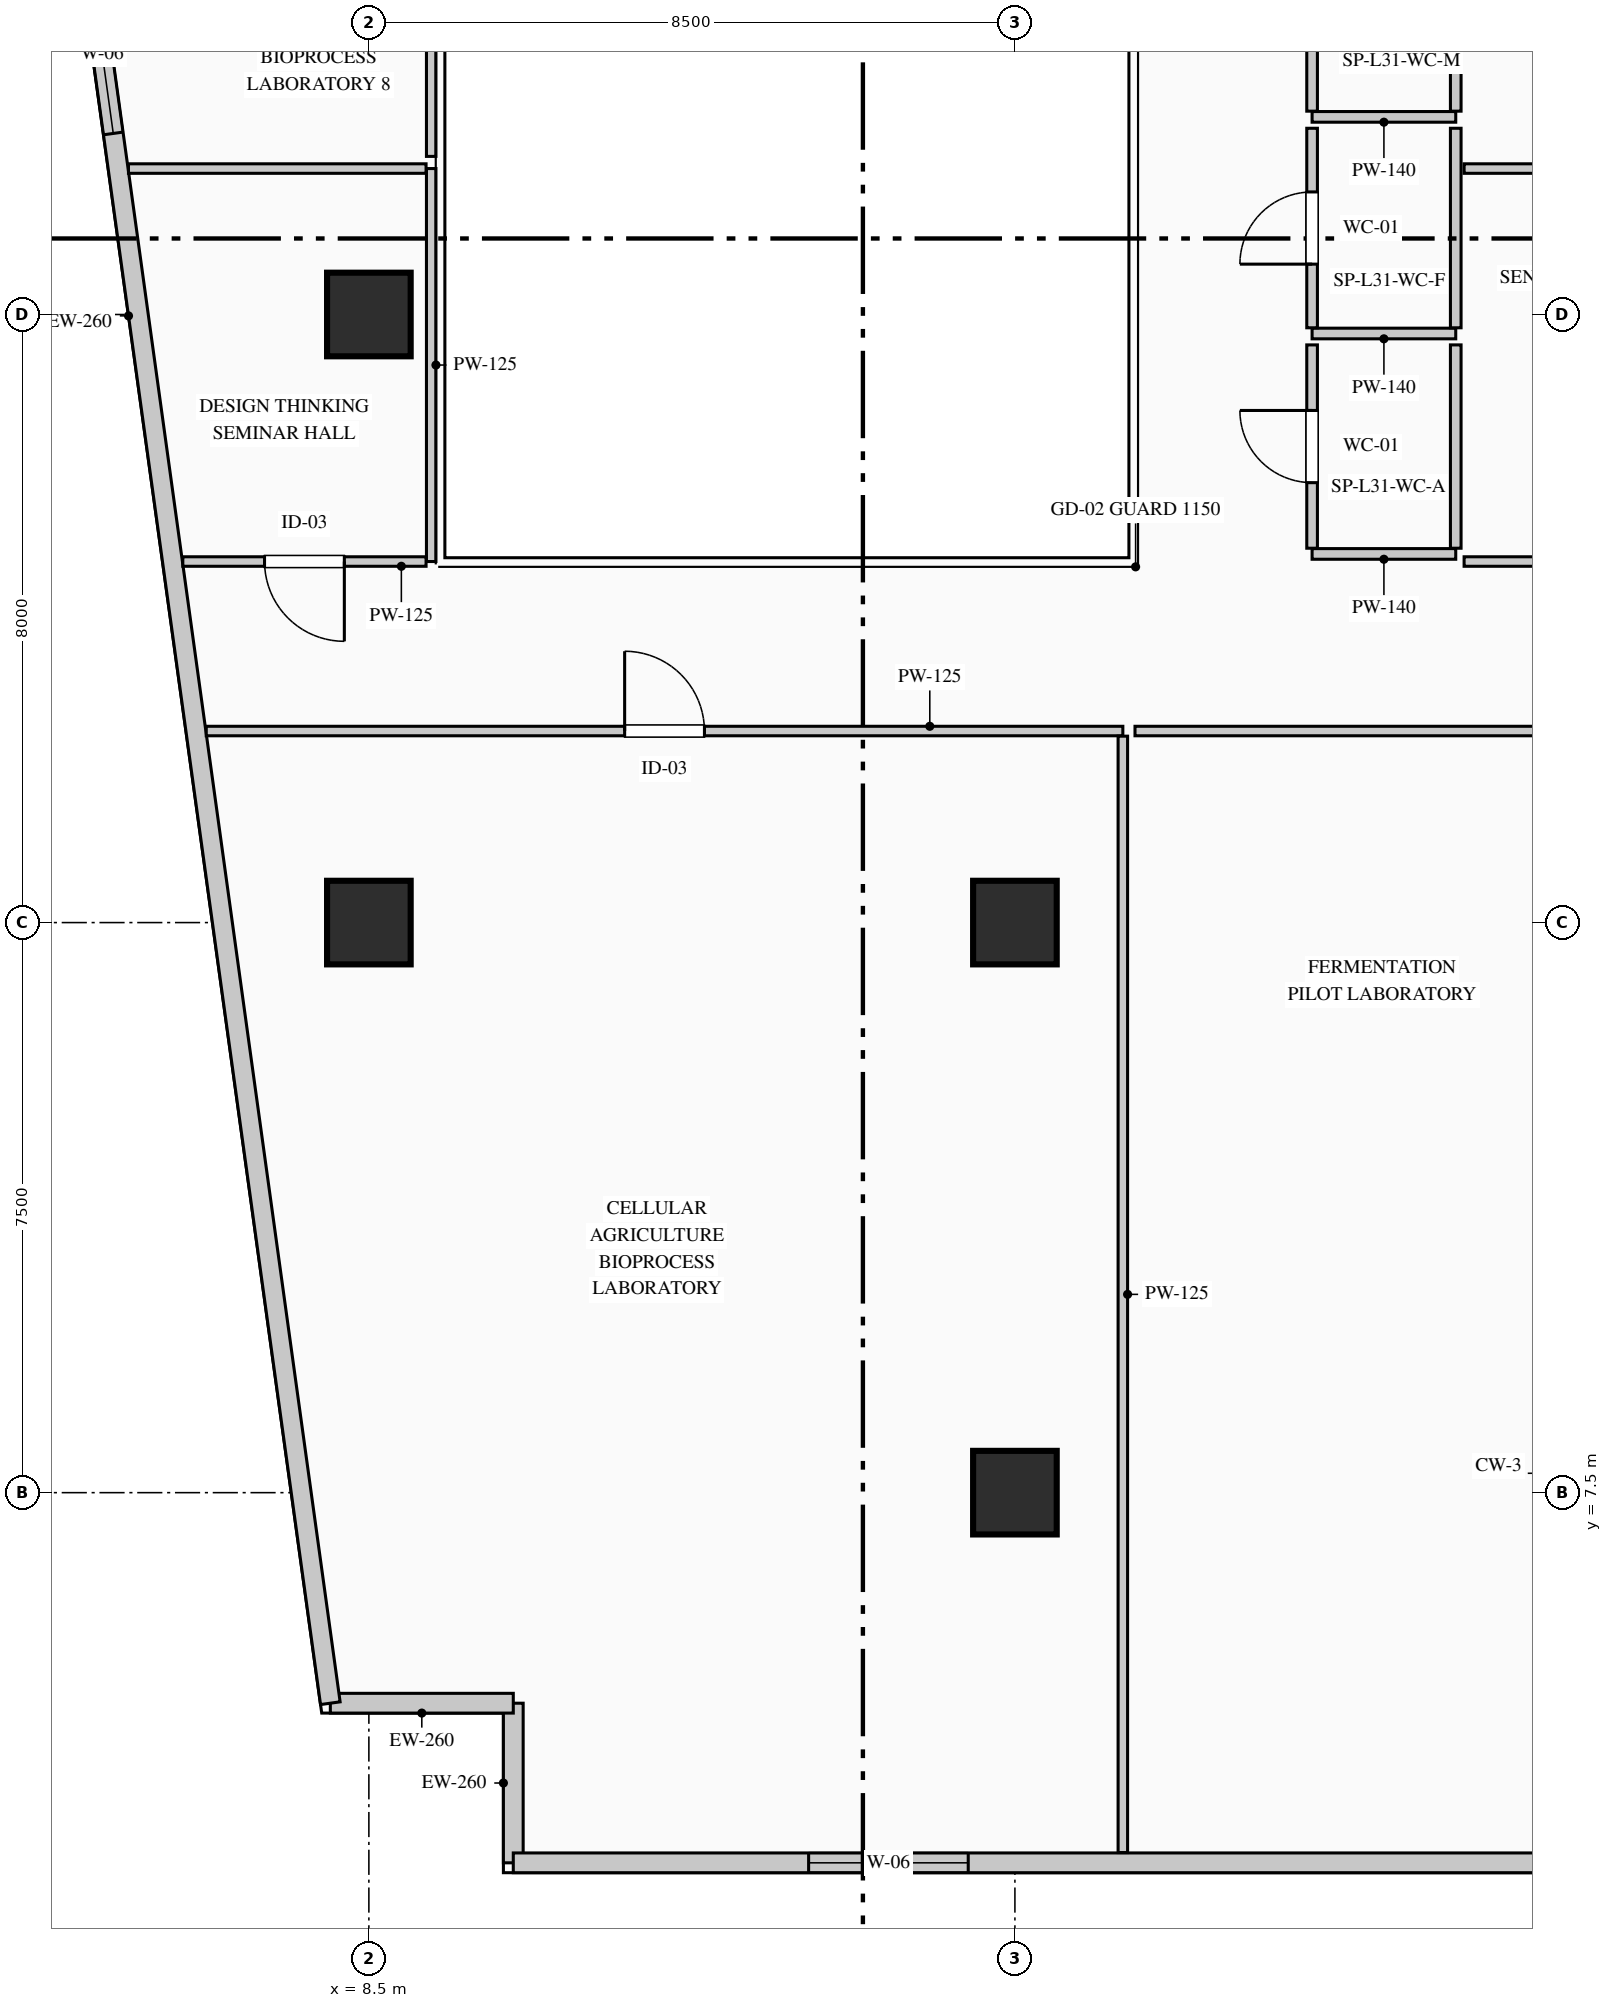
"""IFC4 building model, lengths in metres.
Left out: names, types, materials, properties, quantities, classifications, styles, units other than length and angle.
Written with IfcOpenShell. Run it as: python <this file> out.ifc"""

import sys

from ifc_helpers import new_model, si_unit, direction, frame, frame_2d, origin, origin_2d, place, context, subcontext, project, spatial, rectangle, extrude, element, fill, save


model = new_model("IFC4")
c1 = context("Model", 3, precision=1e-05, world=origin(), true_north=direction((0.0, 1.0)))
c2 = subcontext(c1, "Body", "Model", "MODEL_VIEW")
j1 = project(units=[si_unit("LENGTHUNIT", "METRE"), si_unit("PLANEANGLEUNIT", "RADIAN")], contexts=[c1])
p1 = place(None, origin())
s1 = spatial("IfcSite", under=j1, at=p1, CompositionType="ELEMENT")
p2 = place(p1, origin())
s2 = spatial("IfcBuilding", under=s1, at=p2, CompositionType="ELEMENT")
p3 = place(p2, frame((0.0, 0.0, 135.1)))
s3 = spatial("IfcBuildingStorey", under=s2, at=p3, CompositionType="ELEMENT", Elevation=135.1)
for number, where, z_axis, x_axis in (
    (1, (8.5, 15.0, 0.0), (0.0, 0.0, 1.0), (1.0, 0.0, 0.0)),
    (2, (8.5, 23.0, 0.0), (0.0, 0.0, 1.0), (1.0, 0.0, 0.0)),
    (3, (17.0, 7.5, 0.0), (0.0, 0.0, 1.0), (1.0, 0.0, 0.0)),
    (4, (17.0, 15.0, 0.0), (0.0, 0.0, 1.0), (1.0, 0.0, 0.0)),
):
    element("IfcColumn", number, at=place(p3, frame(where, z_axis=z_axis, x_axis=x_axis)), inside=s3, PredefinedType="COLUMN", context=c2, shape_type="SweptSolid", body=[
        extrude(rectangle(XDim=1.1, YDim=1.1, at=origin_2d()), origin(), (0.0, 0.0, 1.0), 3.95),
    ])
p4 = place(p3, frame((10.4, 2.63, 0.0), z_axis=(0.0, 0.0, 1.0), x_axis=(0.0, 1.0, 0.0)))
e5 = element("IfcWall", 5, at=p4, inside=s3, PredefinedType="STANDARD", context=c2, shape_type="SweptSolid", body=[
    extrude(rectangle(XDim=2.1, YDim=0.26, at=frame_2d((1.05, 0.0))), origin(), (0.0, 0.0, 1.0), 3.69),
])
p5 = place(p3, frame((10.4, 4.73, 0.0), z_axis=(0.0, 0.0, 1.0), x_axis=(-1.0, 0.0, 0.0)))
e6 = element("IfcWall", 6, at=p5, inside=s3, PredefinedType="STANDARD", context=c2, shape_type="SweptSolid", body=[
    extrude(rectangle(XDim=2.407, YDim=0.26, at=frame_2d((1.204, 0.0))), origin(), (0.0, 0.0, 1.0), 3.69),
])
p6 = place(p3, frame((7.993, 4.73, 0.0), z_axis=(0.0, 0.0, 1.0), x_axis=(-0.136989009016, 0.990572567462, 0.0)))
e7 = element("IfcWall", 7, at=p6, inside=s3, PredefinedType="STANDARD", context=c2, shape_type="SweptSolid", body=[
    extrude(rectangle(XDim=36.888, YDim=0.26, at=frame_2d((18.444, 0.0))), origin(), (0.0, 0.0, 1.0), 3.69),
])
p7 = place(p6, frame((20.848, 0.0, 0.9)))
e8 = element("IfcOpeningElement", 8, at=p7, cuts=e7, PredefinedType="OPENING", context=c2, shape_type="SweptSolid", body=[
    extrude(rectangle(XDim=2.1, YDim=2.0, at=frame_2d((1.05, 1.0))), frame((0.0, 0.14, 0.0), z_axis=(0.0, -1.0, 0.0), x_axis=(1.0, 0.0, 0.0)), (0.0, 0.0, 1.0), 0.28),
])
p8 = place(p3, frame((24.11, 2.63, 0.0), z_axis=(0.0, 0.0, 1.0), x_axis=(-1.0, 0.0, 0.0)))
e9 = element("IfcWall", 9, at=p8, inside=s3, PredefinedType="STANDARD", context=c2, shape_type="SweptSolid", body=[
    extrude(rectangle(XDim=13.71, YDim=0.26, at=frame_2d((6.855, 0.0))), origin(), (0.0, 0.0, 1.0), 3.69),
])
p9 = place(p8, frame((7.724, 0.0, 0.9)))
e10 = element("IfcOpeningElement", 10, at=p9, cuts=e9, PredefinedType="OPENING", context=c2, shape_type="SweptSolid", body=[
    extrude(rectangle(XDim=2.1, YDim=2.0, at=frame_2d((1.05, 1.0))), frame((0.0, 0.14, 0.0), z_axis=(0.0, -1.0, 0.0), x_axis=(1.0, 0.0, 0.0)), (0.0, 0.0, 1.0), 0.28),
])
p10 = place(p3, frame((22.8, 25.6, 0.0), z_axis=(0.0, 0.0, 1.0), x_axis=(-1.0, 0.0, 0.0)))
e11 = element("IfcWall", 11, at=p10, inside=s3, PredefinedType="PARTITIONING", context=c2, shape_type="SweptSolid", body=[
    extrude(rectangle(XDim=1.89, YDim=0.14, at=frame_2d((0.945, 0.0))), origin(), (0.0, 0.0, 1.0), 3.69),
])
p11 = place(p3, frame((20.91, 25.675, 0.0), z_axis=(0.0, 0.0, 1.0), x_axis=(0.0, 1.0, 0.0)))
e12 = element("IfcWall", 12, at=p11, inside=s3, PredefinedType="PARTITIONING", context=c2, shape_type="SweptSolid", body=[
    extrude(rectangle(XDim=2.775, YDim=0.14, at=frame_2d((1.387, 0.0))), origin(), (0.0, 0.0, 1.0), 3.69),
])
p12 = place(p11, frame((0.913, 0.0, 0.0)))
e13 = element("IfcOpeningElement", 13, at=p12, cuts=e12, PredefinedType="OPENING", context=c2, shape_type="SweptSolid", body=[
    extrude(rectangle(XDim=0.95, YDim=2.15, at=frame_2d((0.475, 1.075))), frame((0.0, 0.08, 0.0), z_axis=(0.0, -1.0, 0.0), x_axis=(1.0, 0.0, 0.0)), (0.0, 0.0, 1.0), 0.16),
])
p13 = place(p3, frame((22.8, 28.375, 0.0), z_axis=(0.0, 0.0, 1.0), x_axis=(0.0, -1.0, 0.0)))
e14 = element("IfcWall", 14, at=p13, inside=s3, PredefinedType="PARTITIONING", context=c2, shape_type="SweptSolid", body=[
    extrude(rectangle(XDim=2.7, YDim=0.14, at=frame_2d((1.35, 0.0))), origin(), (0.0, 0.0, 1.0), 3.275),
])
p14 = place(p3, frame((22.8, 22.75, 0.0), z_axis=(0.0, 0.0, 1.0), x_axis=(-1.0, 0.0, 0.0)))
e15 = element("IfcWall", 15, at=p14, inside=s3, PredefinedType="PARTITIONING", context=c2, shape_type="SweptSolid", body=[
    extrude(rectangle(XDim=1.89, YDim=0.14, at=frame_2d((0.945, 0.0))), origin(), (0.0, 0.0, 1.0), 3.69),
])
p15 = place(p3, frame((20.91, 22.825, 0.0), z_axis=(0.0, 0.0, 1.0), x_axis=(0.0, 1.0, 0.0)))
e16 = element("IfcWall", 16, at=p15, inside=s3, PredefinedType="PARTITIONING", context=c2, shape_type="SweptSolid", body=[
    extrude(rectangle(XDim=2.625, YDim=0.14, at=frame_2d((1.312, 0.0))), origin(), (0.0, 0.0, 1.0), 3.69),
])
p16 = place(p15, frame((0.837, 0.0, 0.0)))
e17 = element("IfcOpeningElement", 17, at=p16, cuts=e16, PredefinedType="OPENING", context=c2, shape_type="SweptSolid", body=[
    extrude(rectangle(XDim=0.95, YDim=2.15, at=frame_2d((0.475, 1.075))), frame((0.0, 0.08, 0.0), z_axis=(0.0, -1.0, 0.0), x_axis=(1.0, 0.0, 0.0)), (0.0, 0.0, 1.0), 0.16),
])
p17 = place(p3, frame((22.8, 25.45, 0.0), z_axis=(0.0, 0.0, 1.0), x_axis=(0.0, -1.0, 0.0)))
e18 = element("IfcWall", 18, at=p17, inside=s3, PredefinedType="PARTITIONING", context=c2, shape_type="SweptSolid", body=[
    extrude(rectangle(XDim=2.625, YDim=0.14, at=frame_2d((1.312, 0.0))), origin(), (0.0, 0.0, 1.0), 3.275),
])
p18 = place(p3, frame((22.8, 19.85, 0.0), z_axis=(0.0, 0.0, 1.0), x_axis=(-1.0, 0.0, 0.0)))
e19 = element("IfcWall", 19, at=p18, inside=s3, PredefinedType="PARTITIONING", context=c2, shape_type="SweptSolid", body=[
    extrude(rectangle(XDim=1.89, YDim=0.14, at=frame_2d((0.945, 0.0))), origin(), (0.0, 0.0, 1.0), 3.69),
])
p19 = place(p3, frame((20.91, 19.925, 0.0), z_axis=(0.0, 0.0, 1.0), x_axis=(0.0, 1.0, 0.0)))
e20 = element("IfcWall", 20, at=p19, inside=s3, PredefinedType="PARTITIONING", context=c2, shape_type="SweptSolid", body=[
    extrude(rectangle(XDim=2.675, YDim=0.14, at=frame_2d((1.337, 0.0))), origin(), (0.0, 0.0, 1.0), 3.69),
])
p20 = place(p19, frame((0.863, 0.0, 0.0)))
e21 = element("IfcOpeningElement", 21, at=p20, cuts=e20, PredefinedType="OPENING", context=c2, shape_type="SweptSolid", body=[
    extrude(rectangle(XDim=0.95, YDim=2.15, at=frame_2d((0.475, 1.075))), frame((0.0, 0.08, 0.0), z_axis=(0.0, -1.0, 0.0), x_axis=(1.0, 0.0, 0.0)), (0.0, 0.0, 1.0), 0.16),
])
p21 = place(p3, frame((22.8, 22.6, 0.0), z_axis=(0.0, 0.0, 1.0), x_axis=(0.0, -1.0, 0.0)))
e22 = element("IfcWall", 22, at=p21, inside=s3, PredefinedType="PARTITIONING", context=c2, shape_type="SweptSolid", body=[
    extrude(rectangle(XDim=2.675, YDim=0.14, at=frame_2d((1.337, 0.0))), origin(), (0.0, 0.0, 1.0), 3.275),
])
p22 = place(p3, frame((6.36, 17.52, 0.0), z_axis=(0.0, 0.0, 1.0), x_axis=(1.0, 0.0, 0.0)))
e23 = element("IfcWall", 23, at=p22, inside=s3, PredefinedType="PARTITIONING", context=c2, shape_type="SweptSolid", body=[
    extrude(rectangle(XDim=12.06, YDim=0.125, at=frame_2d((6.03, 0.0))), origin(), (0.0, 0.0, 1.0), 3.69),
])
p23 = place(p22, frame((5.505, 0.0, 0.0)))
e24 = element("IfcOpeningElement", 24, at=p23, cuts=e23, PredefinedType="OPENING", context=c2, shape_type="SweptSolid", body=[
    extrude(rectangle(XDim=1.05, YDim=2.15, at=frame_2d((0.525, 1.075))), frame((0.0, 0.073, 0.0), z_axis=(0.0, -1.0, 0.0), x_axis=(1.0, 0.0, 0.0)), (0.0, 0.0, 1.0), 0.145),
])
p24 = place(p3, frame((18.42, 17.452, 0.0), z_axis=(0.0, 0.0, 1.0), x_axis=(0.0, -1.0, 0.0)))
e25 = element("IfcWall", 25, at=p24, inside=s3, PredefinedType="PARTITIONING", context=c2, shape_type="SweptSolid", body=[
    extrude(rectangle(XDim=14.688, YDim=0.125, at=frame_2d((7.344, 0.0))), origin(), (0.0, 0.0, 1.0), 3.69),
])
p25 = place(p3, frame((18.58, 17.52, 0.0), z_axis=(0.0, 0.0, 1.0), x_axis=(1.0, 0.0, 0.0)))
e26 = element("IfcWall", 26, at=p25, inside=s3, PredefinedType="PARTITIONING", context=c2, shape_type="SweptSolid", body=[
    extrude(rectangle(XDim=16.84, YDim=0.125, at=frame_2d((8.42, 0.0))), origin(), (0.0, 0.0, 1.0), 3.275),
])
p26 = place(p25, frame((7.895, 0.0, 0.0)))
e27 = element("IfcOpeningElement", 27, at=p26, cuts=e26, PredefinedType="OPENING", context=c2, shape_type="SweptSolid", body=[
    extrude(rectangle(XDim=1.05, YDim=2.15, at=frame_2d((0.525, 1.075))), frame((0.0, 0.073, 0.0), z_axis=(0.0, -1.0, 0.0), x_axis=(1.0, 0.0, 0.0)), (0.0, 0.0, 1.0), 0.145),
])
p27 = place(p3, frame((9.32, 24.92, 0.0), z_axis=(0.0, 0.0, 1.0), x_axis=(0.0, -1.0, 0.0)))
e28 = element("IfcWall", 28, at=p27, inside=s3, PredefinedType="PARTITIONING", context=c2, shape_type="SweptSolid", body=[
    extrude(rectangle(XDim=5.17, YDim=0.125, at=frame_2d((2.585, 0.0))), origin(), (0.0, 0.0, 1.0), 3.475),
])
p28 = place(p3, frame((9.252, 19.75, 0.0), z_axis=(0.0, 0.0, 1.0), x_axis=(-1.0, 0.0, 0.0)))
e29 = element("IfcWall", 29, at=p28, inside=s3, PredefinedType="PARTITIONING", context=c2, shape_type="SweptSolid", body=[
    extrude(rectangle(XDim=3.2, YDim=0.125, at=frame_2d((1.6, 0.0))), origin(), (0.0, 0.0, 1.0), 3.69),
])
p29 = place(p28, frame((1.075, 0.0, 0.0)))
e30 = element("IfcOpeningElement", 30, at=p29, cuts=e29, PredefinedType="OPENING", context=c2, shape_type="SweptSolid", body=[
    extrude(rectangle(XDim=1.05, YDim=2.15, at=frame_2d((0.525, 1.075))), frame((0.0, 0.073, 0.0), z_axis=(0.0, -1.0, 0.0), x_axis=(1.0, 0.0, 0.0)), (0.0, 0.0, 1.0), 0.145),
])
p30 = place(p3, frame((5.337, 24.92, 0.0), z_axis=(0.0, 0.0, 1.0), x_axis=(1.0, 0.0, 0.0)))
e31 = element("IfcWall", 31, at=p30, inside=s3, PredefinedType="PARTITIONING", context=c2, shape_type="SweptSolid", body=[
    extrude(rectangle(XDim=3.916, YDim=0.125, at=frame_2d((1.958, 0.0))), origin(), (0.0, 0.0, 1.0), 3.69),
])
p31 = place(p3, frame((25.976, 19.75, 0.0), z_axis=(0.0, 0.0, 1.0), x_axis=(-1.0, 0.0, 0.0)))
e32 = element("IfcWall", 32, at=p31, inside=s3, PredefinedType="PARTITIONING", context=c2, shape_type="SweptSolid", body=[
    extrude(rectangle(XDim=3.066, YDim=0.125, at=frame_2d((1.533, 0.0))), origin(), (0.0, 0.0, 1.0), 3.69),
])
p32 = place(p31, frame((1.008, 0.0, 0.0)))
e33 = element("IfcOpeningElement", 33, at=p32, cuts=e32, PredefinedType="OPENING", context=c2, shape_type="SweptSolid", body=[
    extrude(rectangle(XDim=1.05, YDim=2.15, at=frame_2d((0.525, 1.075))), frame((0.0, 0.073, 0.0), z_axis=(0.0, -1.0, 0.0), x_axis=(1.0, 0.0, 0.0)), (0.0, 0.0, 1.0), 0.145),
])
p33 = place(p3, frame((22.91, 24.92, 0.0), z_axis=(0.0, 0.0, 1.0), x_axis=(1.0, 0.0, 0.0)))
e34 = element("IfcWall", 34, at=p33, inside=s3, PredefinedType="PARTITIONING", context=c2, shape_type="SweptSolid", body=[
    extrude(rectangle(XDim=11.46, YDim=0.125, at=frame_2d((5.73, 0.0))), origin(), (0.0, 0.0, 1.0), 3.275),
])
p34 = place(p3, frame((9.32, 28.502, 0.0), z_axis=(0.0, 0.0, 1.0), x_axis=(0.0, -1.0, 0.0)))
e35 = element("IfcWall", 35, at=p34, inside=s3, PredefinedType="PARTITIONING", context=c2, shape_type="SweptSolid", body=[
    extrude(rectangle(XDim=3.422, YDim=0.125, at=frame_2d((1.711, 0.0))), origin(), (0.0, 0.0, 1.0), 3.475),
])
p35 = place(p7, origin())
e36 = element("IfcWindow", 36, at=p35, inside=s3, PartitioningType="DOUBLE_PANEL_VERTICAL", PredefinedType="WINDOW", context=c2, shape_type="SweptSolid", body=[
    extrude(rectangle(XDim=2.1, YDim=2.0, at=frame_2d((1.05, 1.0))), frame((0.0, 0.03, 0.0), z_axis=(0.0, -1.0, 0.0), x_axis=(1.0, 0.0, 0.0)), (0.0, 0.0, 1.0), 0.06),
])
fill(e8, e36)
p36 = place(p9, origin())
e37 = element("IfcWindow", 37, at=p36, inside=s3, PartitioningType="DOUBLE_PANEL_VERTICAL", PredefinedType="WINDOW", context=c2, shape_type="SweptSolid", body=[
    extrude(rectangle(XDim=2.1, YDim=2.0, at=frame_2d((1.05, 1.0))), frame((0.0, 0.03, 0.0), z_axis=(0.0, -1.0, 0.0), x_axis=(1.0, 0.0, 0.0)), (0.0, 0.0, 1.0), 0.06),
])
fill(e10, e37)
p37 = place(p16, origin())
e38 = element("IfcDoor", 38, at=p37, inside=s3, OperationType="SINGLE_SWING_LEFT", PredefinedType="DOOR", context=c2, shape_type="SweptSolid", body=[
    extrude(rectangle(XDim=0.95, YDim=2.15, at=frame_2d((0.475, 1.075))), frame((0.0, 0.025, 0.0), z_axis=(0.0, -1.0, 0.0), x_axis=(1.0, 0.0, 0.0)), (0.0, 0.0, 1.0), 0.05),
])
fill(e17, e38)
p38 = place(p20, origin())
e39 = element("IfcDoor", 39, at=p38, inside=s3, OperationType="SINGLE_SWING_RIGHT", PredefinedType="DOOR", context=c2, shape_type="SweptSolid", body=[
    extrude(rectangle(XDim=0.95, YDim=2.15, at=frame_2d((0.475, 1.075))), frame((0.0, 0.025, 0.0), z_axis=(0.0, -1.0, 0.0), x_axis=(1.0, 0.0, 0.0)), (0.0, 0.0, 1.0), 0.05),
])
fill(e21, e39)
p39 = place(p23, origin())
e40 = element("IfcDoor", 40, at=p39, inside=s3, OperationType="SINGLE_SWING_LEFT", PredefinedType="DOOR", context=c2, shape_type="SweptSolid", body=[
    extrude(rectangle(XDim=1.05, YDim=2.15, at=frame_2d((0.525, 1.075))), frame((0.0, 0.025, 0.0), z_axis=(0.0, -1.0, 0.0), x_axis=(1.0, 0.0, 0.0)), (0.0, 0.0, 1.0), 0.05),
])
fill(e24, e40)
p40 = place(p29, origin())
e41 = element("IfcDoor", 41, at=p40, inside=s3, OperationType="SINGLE_SWING_LEFT", PredefinedType="DOOR", context=c2, shape_type="SweptSolid", body=[
    extrude(rectangle(XDim=1.05, YDim=2.15, at=frame_2d((0.525, 1.075))), frame((0.0, 0.025, 0.0), z_axis=(0.0, -1.0, 0.0), x_axis=(1.0, 0.0, 0.0)), (0.0, 0.0, 1.0), 0.05),
])
fill(e30, e41)
save(model, sys.argv[1])
